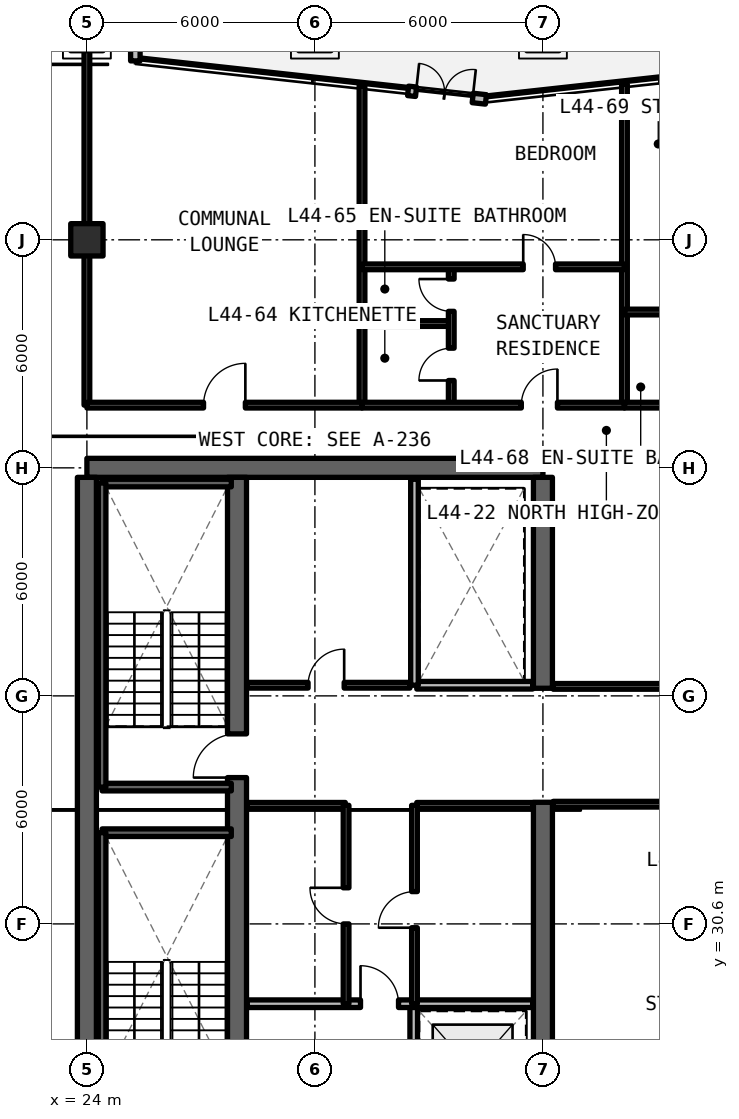
"""IFC4 building model, lengths in metres.
Left out: names, types, materials, properties, quantities, classifications, styles, units other than length and angle.
Written with IfcOpenShell. Run it as: python <this file> out.ifc"""

import sys

from ifc_helpers import new_model, si_unit, direction, frame, frame_2d, origin, origin_2d, place, context, subcontext, project, spatial, rectangle, extrude, element, fill, save


model = new_model("IFC4")
c1 = context("Model", 3, precision=1e-05, world=origin(), true_north=direction((0.0, 1.0)))
c2 = subcontext(c1, "Body", "Model", "MODEL_VIEW")
j1 = project(units=[si_unit("LENGTHUNIT", "METRE"), si_unit("PLANEANGLEUNIT", "RADIAN")], contexts=[c1])
p1 = place(None, origin())
s1 = spatial("IfcSite", under=j1, at=p1, CompositionType="ELEMENT")
p2 = place(p1, origin())
s2 = spatial("IfcBuilding", under=s1, at=p2, CompositionType="ELEMENT")
p3 = place(p2, frame((0.0, 0.0, 158.4)))
s3 = spatial("IfcBuildingStorey", under=s2, at=p3, CompositionType="ELEMENT", Elevation=158.4)
p4 = place(p3, frame((36.0, 42.6, 0.0), z_axis=(0.0, 0.0, 1.0), x_axis=(-1.0, 0.0, 0.0)))
e1 = element("IfcWall", 1, at=p4, inside=s3, PredefinedType="SHEAR", context=c2, shape_type="SweptSolid", body=[
    extrude(rectangle(XDim=12.0, YDim=0.5, at=frame_2d((6.0, 0.0))), origin(), (0.0, 0.0, 1.0), 3.63),
])
p5 = place(p3, frame((24.0, 24.85, 0.0), z_axis=(0.0, 0.0, 1.0), x_axis=(0.0, 1.0, 0.0)))
e2 = element("IfcWall", 2, at=p5, inside=s3, PredefinedType="SHEAR", context=c2, shape_type="SweptSolid", body=[
    extrude(rectangle(XDim=17.5, YDim=0.5, at=frame_2d((8.75, 0.0))), origin(), (0.0, 0.0, 1.0), 3.63),
])
p6 = place(p3, frame((36.0, 24.85, 0.0), z_axis=(0.0, 0.0, 1.0), x_axis=(0.0, 1.0, 0.0)))
e3 = element("IfcWall", 3, at=p6, inside=s3, PredefinedType="SHEAR", context=c2, shape_type="SweptSolid", body=[
    extrude(rectangle(XDim=8.95, YDim=0.5, at=frame_2d((4.475, 0.0))), origin(), (0.0, 0.0, 1.0), 3.63),
])
p7 = place(p3, frame((36.0, 36.8, 0.0), z_axis=(0.0, 0.0, 1.0), x_axis=(0.0, 1.0, 0.0)))
e4 = element("IfcWall", 4, at=p7, inside=s3, PredefinedType="SHEAR", context=c2, shape_type="SweptSolid", body=[
    extrude(rectangle(XDim=5.55, YDim=0.5, at=frame_2d((2.775, 0.0))), origin(), (0.0, 0.0, 1.0), 3.63),
])
p8 = place(p3, frame((27.95, 24.85, 0.0), z_axis=(0.0, 0.0, 1.0), x_axis=(0.0, 1.0, 0.0)))
e5 = element("IfcWall", 5, at=p8, inside=s3, PredefinedType="SHEAR", context=c2, shape_type="SweptSolid", body=[
    extrude(rectangle(XDim=17.5, YDim=0.5, at=frame_2d((8.75, 0.0))), origin(), (0.0, 0.0, 1.0), 3.63),
])
p9 = place(p8, frame((0.4, 0.0, 0.0)))
e6 = element("IfcOpeningElement", 6, at=p9, cuts=e5, PredefinedType="OPENING", context=c2, shape_type="SweptSolid", body=[
    extrude(rectangle(XDim=1.15, YDim=2.15, at=frame_2d((0.575, 1.075))), frame((0.0, 0.26, 0.0), z_axis=(0.0, -1.0, 0.0), x_axis=(1.0, 0.0, 0.0)), (0.0, 0.0, 1.0), 0.52),
])
p10 = place(p8, frame((9.6, 0.0, 0.0)))
e7 = element("IfcOpeningElement", 7, at=p10, cuts=e5, PredefinedType="OPENING", context=c2, shape_type="SweptSolid", body=[
    extrude(rectangle(XDim=1.15, YDim=2.15, at=frame_2d((0.575, 1.075))), frame((0.0, 0.26, 0.0), z_axis=(0.0, -1.0, 0.0), x_axis=(1.0, 0.0, 0.0)), (0.0, 0.0, 1.0), 0.52),
])
p11 = place(p3, frame((24.0, 48.6, 0.0), z_axis=(0.0, 0.0, 1.0), x_axis=(1.0, 0.0, 0.0)))
e8 = element("IfcColumn", 8, at=p11, inside=s3, PredefinedType="COLUMN", context=c2, shape_type="SweptSolid", body=[
    extrude(rectangle(XDim=0.85, YDim=0.85, at=origin_2d()), origin(), (0.0, 0.0, 1.0), 3.63),
])
p12 = place(p3, frame((34.5, 52.294, 0.0), z_axis=(0.0, 0.0, 1.0), x_axis=(-0.994011695941, 0.10927373121, 0.0)))
e9 = element("IfcWall", 9, at=p12, inside=s3, PredefinedType="SOLIDWALL", context=c2, shape_type="SweptSolid", body=[
    extrude(rectangle(XDim=2.06, YDim=0.25, at=frame_2d((1.03, 0.0))), origin(), (0.0, 0.0, 1.0), 3.41),
])
p13 = place(p12, frame((0.35, 0.0, 0.0)))
e10 = element("IfcOpeningElement", 10, at=p13, cuts=e9, PredefinedType="OPENING", context=c2, shape_type="SweptSolid", body=[
    extrude(rectangle(XDim=1.5, YDim=2.2, at=frame_2d((0.75, 1.1))), frame((0.0, 0.135, 0.0), z_axis=(0.0, -1.0, 0.0), x_axis=(1.0, 0.0, 0.0)), (0.0, 0.0, 1.0), 0.27),
])
p14 = place(p3, frame((25.275, 53.308, 0.0), z_axis=(0.0, 0.0, 1.0), x_axis=(0.0, 1.0, 0.0)))
e11 = element("IfcWall", 11, at=p14, inside=s3, PredefinedType="SOLIDWALL", context=c2, shape_type="SweptSolid", body=[
    extrude(rectangle(XDim=1.867, YDim=0.25, at=frame_2d((0.934, 0.0))), origin(), (0.0, 0.0, 1.0), 3.41),
])
p15 = place(p3, frame((23.852, 55.175, 0.0), z_axis=(0.0, 0.0, 1.0), x_axis=(-0.70708586489, -0.707127696864, 0.0)))
e12 = element("IfcWall", 12, at=p15, inside=s3, PredefinedType="SOLIDWALL", context=c2, shape_type="SweptSolid", body=[
    extrude(rectangle(XDim=5.836, YDim=0.25, at=frame_2d((2.918, 0.0))), origin(), (0.0, 0.0, 1.0), 3.41),
])
p16 = place(p15, frame((1.538, 0.0, 0.78)))
e13 = element("IfcOpeningElement", 13, at=p16, cuts=e12, PredefinedType="OPENING", context=c2, shape_type="SweptSolid", body=[
    extrude(rectangle(XDim=3.4, YDim=1.66, at=frame_2d((1.7, 0.83))), frame((0.0, 0.135, 0.0), z_axis=(0.0, -1.0, 0.0), x_axis=(1.0, 0.0, 0.0)), (0.0, 0.0, 1.0), 0.27),
])
p17 = place(p3, frame((32.6, 24.92, 0.0), z_axis=(0.0, 0.0, 1.0), x_axis=(0.0, 1.0, 0.0)))
e14 = element("IfcWall", 14, at=p17, inside=s3, PredefinedType="SOLIDWALL", context=c2, shape_type="SweptSolid", body=[
    extrude(rectangle(XDim=3.58, YDim=0.2, at=frame_2d((1.79, 0.0))), origin(), (0.0, 0.0, 1.0), 2.63),
])
p18 = place(p17, frame((1.3, 0.0, 0.0)))
e15 = element("IfcOpeningElement", 15, at=p18, cuts=e14, PredefinedType="OPENING", context=c2, shape_type="SweptSolid", body=[
    extrude(rectangle(XDim=1.1, YDim=2.2, at=frame_2d((0.55, 1.1))), frame((0.0, 0.11, 0.0), z_axis=(0.0, -1.0, 0.0), x_axis=(1.0, 0.0, 0.0)), (0.0, 0.0, 1.0), 0.22),
])
p19 = place(p3, frame((28.22, 28.5, 0.0), z_axis=(0.0, 0.0, 1.0), x_axis=(1.0, 0.0, 0.0)))
e16 = element("IfcWall", 16, at=p19, inside=s3, PredefinedType="SOLIDWALL", context=c2, shape_type="SweptSolid", body=[
    extrude(rectangle(XDim=7.51, YDim=0.2, at=frame_2d((3.755, 0.0))), origin(), (0.0, 0.0, 1.0), 2.63),
])
p20 = place(p19, frame((2.98, 0.0, 0.0)))
e17 = element("IfcOpeningElement", 17, at=p20, cuts=e16, PredefinedType="OPENING", context=c2, shape_type="SweptSolid", body=[
    extrude(rectangle(XDim=1.0, YDim=2.15, at=frame_2d((0.5, 1.075))), frame((0.0, 0.11, 0.0), z_axis=(0.0, -1.0, 0.0), x_axis=(1.0, 0.0, 0.0)), (0.0, 0.0, 1.0), 0.22),
])
p21 = place(p3, frame((28.22, 33.72, 0.0), z_axis=(0.0, 0.0, 1.0), x_axis=(1.0, 0.0, 0.0)))
e18 = element("IfcWall", 18, at=p21, inside=s3, PredefinedType="SOLIDWALL", context=c2, shape_type="SweptSolid", body=[
    extrude(rectangle(XDim=2.58, YDim=0.15, at=frame_2d((1.29, 0.0))), origin(), (0.0, 0.0, 1.0), 2.63),
])
p22 = place(p3, frame((30.82, 28.5, 0.0), z_axis=(0.0, 0.0, 1.0), x_axis=(0.0, 1.0, 0.0)))
e19 = element("IfcWall", 19, at=p22, inside=s3, PredefinedType="SOLIDWALL", context=c2, shape_type="SweptSolid", body=[
    extrude(rectangle(XDim=5.22, YDim=0.15, at=frame_2d((2.61, 0.0))), origin(), (0.0, 0.0, 1.0), 2.63),
])
p23 = place(p22, frame((2.1, 0.0, 0.0)))
e20 = element("IfcOpeningElement", 20, at=p23, cuts=e19, PredefinedType="OPENING", context=c2, shape_type="SweptSolid", body=[
    extrude(rectangle(XDim=0.95, YDim=2.15, at=frame_2d((0.475, 1.075))), frame((0.0, 0.085, 0.0), z_axis=(0.0, -1.0, 0.0), x_axis=(1.0, 0.0, 0.0)), (0.0, 0.0, 1.0), 0.17),
])
p24 = place(p3, frame((32.68, 33.72, 0.0), z_axis=(0.0, 0.0, 1.0), x_axis=(1.0, 0.0, 0.0)))
e21 = element("IfcWall", 21, at=p24, inside=s3, PredefinedType="SOLIDWALL", context=c2, shape_type="SweptSolid", body=[
    extrude(rectangle(XDim=3.05, YDim=0.15, at=frame_2d((1.525, 0.0))), origin(), (0.0, 0.0, 1.0), 2.63),
])
p25 = place(p3, frame((32.62, 28.5, 0.0), z_axis=(0.0, 0.0, 1.0), x_axis=(0.0, 1.0, 0.0)))
e22 = element("IfcWall", 22, at=p25, inside=s3, PredefinedType="SOLIDWALL", context=c2, shape_type="SweptSolid", body=[
    extrude(rectangle(XDim=5.22, YDim=0.15, at=frame_2d((2.61, 0.0))), origin(), (0.0, 0.0, 1.0), 2.63),
])
p26 = place(p25, frame((2.0, 0.0, 0.0)))
e23 = element("IfcOpeningElement", 23, at=p26, cuts=e22, PredefinedType="OPENING", context=c2, shape_type="SweptSolid", body=[
    extrude(rectangle(XDim=0.95, YDim=2.15, at=frame_2d((0.475, 1.075))), frame((0.0, 0.085, 0.0), z_axis=(0.0, -1.0, 0.0), x_axis=(1.0, 0.0, 0.0)), (0.0, 0.0, 1.0), 0.17),
])
p27 = place(p3, frame((28.22, 36.88, 0.0), z_axis=(0.0, 0.0, 1.0), x_axis=(1.0, 0.0, 0.0)))
e24 = element("IfcWall", 24, at=p27, inside=s3, PredefinedType="SOLIDWALL", context=c2, shape_type="SweptSolid", body=[
    extrude(rectangle(XDim=4.28, YDim=0.15, at=frame_2d((2.14, 0.0))), origin(), (0.0, 0.0, 1.0), 2.63),
])
p28 = place(p27, frame((1.6, 0.0, 0.0)))
e25 = element("IfcOpeningElement", 25, at=p28, cuts=e24, PredefinedType="OPENING", context=c2, shape_type="SweptSolid", body=[
    extrude(rectangle(XDim=0.95, YDim=2.15, at=frame_2d((0.475, 1.075))), frame((0.0, 0.085, 0.0), z_axis=(0.0, -1.0, 0.0), x_axis=(1.0, 0.0, 0.0)), (0.0, 0.0, 1.0), 0.17),
])
p29 = place(p3, frame((32.68, 36.88, 0.0), z_axis=(0.0, 0.0, 1.0), x_axis=(1.0, 0.0, 0.0)))
e26 = element("IfcWall", 26, at=p29, inside=s3, PredefinedType="SOLIDWALL", context=c2, shape_type="SweptSolid", body=[
    extrude(rectangle(XDim=3.05, YDim=0.2, at=frame_2d((1.525, 0.0))), origin(), (0.0, 0.0, 1.0), 2.63),
])
p30 = place(p3, frame((32.62, 36.88, 0.0), z_axis=(0.0, 0.0, 1.0), x_axis=(0.0, 1.0, 0.0)))
e27 = element("IfcWall", 27, at=p30, inside=s3, PredefinedType="SOLIDWALL", context=c2, shape_type="SweptSolid", body=[
    extrude(rectangle(XDim=5.42, YDim=0.2, at=frame_2d((2.71, 0.0))), origin(), (0.0, 0.0, 1.0), 2.63),
])
p31 = place(p3, frame((36.27, 33.75, 0.0), z_axis=(0.0, 0.0, 1.0), x_axis=(1.0, 0.0, 0.0)))
e28 = element("IfcWall", 28, at=p31, inside=s3, PredefinedType="SOLIDWALL", context=c2, shape_type="SweptSolid", body=[
    extrude(rectangle(XDim=7.88, YDim=0.15, at=frame_2d((3.94, 0.0))), origin(), (0.0, 0.0, 1.0), 2.63),
])
p32 = place(p31, frame((3.465, 0.0, 0.0)))
e29 = element("IfcOpeningElement", 29, at=p32, cuts=e28, PredefinedType="OPENING", context=c2, shape_type="SweptSolid", body=[
    extrude(rectangle(XDim=0.95, YDim=2.15, at=frame_2d((0.475, 1.075))), frame((0.0, 0.085, 0.0), z_axis=(0.0, -1.0, 0.0), x_axis=(1.0, 0.0, 0.0)), (0.0, 0.0, 1.0), 0.17),
])
p33 = place(p3, frame((36.27, 36.85, 0.0), z_axis=(0.0, 0.0, 1.0), x_axis=(1.0, 0.0, 0.0)))
e30 = element("IfcWall", 30, at=p33, inside=s3, PredefinedType="SOLIDWALL", context=c2, shape_type="SweptSolid", body=[
    extrude(rectangle(XDim=7.88, YDim=0.15, at=frame_2d((3.94, 0.0))), origin(), (0.0, 0.0, 1.0), 2.63),
])
p34 = place(p33, frame((3.465, 0.0, 0.0)))
e31 = element("IfcOpeningElement", 31, at=p34, cuts=e30, PredefinedType="OPENING", context=c2, shape_type="SweptSolid", body=[
    extrude(rectangle(XDim=0.95, YDim=2.15, at=frame_2d((0.475, 1.075))), frame((0.0, 0.085, 0.0), z_axis=(0.0, -1.0, 0.0), x_axis=(1.0, 0.0, 0.0)), (0.0, 0.0, 1.0), 0.17),
])
p35 = place(p3, frame((36.27, 42.85, 0.0), z_axis=(0.0, 0.0, 1.0), x_axis=(1.0, 0.0, 0.0)))
e32 = element("IfcWall", 32, at=p35, inside=s3, PredefinedType="SOLIDWALL", context=c2, shape_type="SweptSolid", body=[
    extrude(rectangle(XDim=7.88, YDim=0.15, at=frame_2d((3.94, 0.0))), origin(), (0.0, 0.0, 1.0), 2.63),
])
p36 = place(p3, frame((24.0, 44.25, 0.0), z_axis=(0.0, 0.0, 1.0), x_axis=(0.0, 1.0, 0.0)))
e33 = element("IfcWall", 33, at=p36, inside=s3, PredefinedType="SOLIDWALL", context=c2, shape_type="SweptSolid", body=[
    extrude(rectangle(XDim=10.925, YDim=0.15, at=frame_2d((5.462, 0.0))), origin(), (0.0, 0.0, 1.0), 2.63),
])
p37 = place(p3, frame((31.24, 44.25, 0.0), z_axis=(0.0, 0.0, 1.0), x_axis=(0.0, 1.0, 0.0)))
e34 = element("IfcWall", 34, at=p37, inside=s3, PredefinedType="SOLIDWALL", context=c2, shape_type="SweptSolid", body=[
    extrude(rectangle(XDim=8.403, YDim=0.15, at=frame_2d((4.201, 0.0))), origin(), (0.0, 0.0, 1.0), 2.63),
])
p38 = place(p3, frame((24.0, 44.25, 0.0), z_axis=(0.0, 0.0, 1.0), x_axis=(1.0, 0.0, 0.0)))
e35 = element("IfcWall", 35, at=p38, inside=s3, PredefinedType="SOLIDWALL", context=c2, shape_type="SweptSolid", body=[
    extrude(rectangle(XDim=7.24, YDim=0.15, at=frame_2d((3.62, 0.0))), origin(), (0.0, 0.0, 1.0), 2.63),
])
p39 = place(p38, frame((3.07, 0.0, 0.0)))
e36 = element("IfcOpeningElement", 36, at=p39, cuts=e35, PredefinedType="OPENING", context=c2, shape_type="SweptSolid", body=[
    extrude(rectangle(XDim=1.1, YDim=2.15, at=frame_2d((0.55, 1.075))), frame((0.0, 0.085, 0.0), z_axis=(0.0, -1.0, 0.0), x_axis=(1.0, 0.0, 0.0)), (0.0, 0.0, 1.0), 0.17),
])
p40 = place(p3, frame((38.146, 44.25, 0.0), z_axis=(0.0, 0.0, 1.0), x_axis=(0.0, 1.0, 0.0)))
e37 = element("IfcWall", 37, at=p40, inside=s3, PredefinedType="SOLIDWALL", context=c2, shape_type="SweptSolid", body=[
    extrude(rectangle(XDim=8.445, YDim=0.15, at=frame_2d((4.222, 0.0))), origin(), (0.0, 0.0, 1.0), 2.63),
])
p41 = place(p3, frame((31.24, 46.397, 0.0), z_axis=(0.0, 0.0, 1.0), x_axis=(1.0, 0.0, 0.0)))
e38 = element("IfcWall", 38, at=p41, inside=s3, PredefinedType="PARTITIONING", context=c2, shape_type="SweptSolid", body=[
    extrude(rectangle(XDim=2.348, YDim=0.15, at=frame_2d((1.174, 0.0))), origin(), (0.0, 0.0, 1.0), 2.63),
])
p42 = place(p3, frame((33.588, 44.25, 0.0), z_axis=(0.0, 0.0, 1.0), x_axis=(0.0, 1.0, 0.0)))
e39 = element("IfcWall", 39, at=p42, inside=s3, PredefinedType="PARTITIONING", context=c2, shape_type="SweptSolid", body=[
    extrude(rectangle(XDim=3.639, YDim=0.15, at=frame_2d((1.819, 0.0))), origin(), (0.0, 0.0, 1.0), 2.63),
])
p43 = place(p42, frame((0.648, 0.0, 0.0)))
e40 = element("IfcOpeningElement", 40, at=p43, cuts=e39, PredefinedType="OPENING", context=c2, shape_type="SweptSolid", body=[
    extrude(rectangle(XDim=0.85, YDim=2.1, at=frame_2d((0.425, 1.05))), frame((0.0, 0.085, 0.0), z_axis=(0.0, -1.0, 0.0), x_axis=(1.0, 0.0, 0.0)), (0.0, 0.0, 1.0), 0.17),
])
p44 = place(p42, frame((2.468, 0.0, 0.0)))
e41 = element("IfcOpeningElement", 41, at=p44, cuts=e39, PredefinedType="OPENING", context=c2, shape_type="SweptSolid", body=[
    extrude(rectangle(XDim=0.85, YDim=2.1, at=frame_2d((0.425, 1.05))), frame((0.0, 0.085, 0.0), z_axis=(0.0, -1.0, 0.0), x_axis=(1.0, 0.0, 0.0)), (0.0, 0.0, 1.0), 0.17),
])
p45 = place(p3, frame((31.24, 47.889, 0.0), z_axis=(0.0, 0.0, 1.0), x_axis=(1.0, 0.0, 0.0)))
e42 = element("IfcWall", 42, at=p45, inside=s3, PredefinedType="PARTITIONING", context=c2, shape_type="SweptSolid", body=[
    extrude(rectangle(XDim=6.906, YDim=0.15, at=frame_2d((3.453, 0.0))), origin(), (0.0, 0.0, 1.0), 2.63),
])
p46 = place(p45, frame((4.242, 0.0, 0.0)))
e43 = element("IfcOpeningElement", 43, at=p46, cuts=e42, PredefinedType="OPENING", context=c2, shape_type="SweptSolid", body=[
    extrude(rectangle(XDim=0.85, YDim=2.1, at=frame_2d((0.425, 1.05))), frame((0.0, 0.085, 0.0), z_axis=(0.0, -1.0, 0.0), x_axis=(1.0, 0.0, 0.0)), (0.0, 0.0, 1.0), 0.17),
])
p47 = place(p3, frame((31.24, 44.25, 0.0), z_axis=(0.0, 0.0, 1.0), x_axis=(1.0, 0.0, 0.0)))
e44 = element("IfcWall", 44, at=p47, inside=s3, PredefinedType="SOLIDWALL", context=c2, shape_type="SweptSolid", body=[
    extrude(rectangle(XDim=6.906, YDim=0.15, at=frame_2d((3.453, 0.0))), origin(), (0.0, 0.0, 1.0), 2.63),
])
p48 = place(p47, frame((4.192, 0.0, 0.0)))
e45 = element("IfcOpeningElement", 45, at=p48, cuts=e44, PredefinedType="OPENING", context=c2, shape_type="SweptSolid", body=[
    extrude(rectangle(XDim=0.95, YDim=2.15, at=frame_2d((0.475, 1.075))), frame((0.0, 0.085, 0.0), z_axis=(0.0, -1.0, 0.0), x_axis=(1.0, 0.0, 0.0)), (0.0, 0.0, 1.0), 0.17),
])
p49 = place(p3, frame((38.146, 46.7, 0.0), z_axis=(0.0, 0.0, 1.0), x_axis=(1.0, 0.0, 0.0)))
e46 = element("IfcWall", 46, at=p49, inside=s3, PredefinedType="PARTITIONING", context=c2, shape_type="SweptSolid", body=[
    extrude(rectangle(XDim=1.85, YDim=0.15, at=frame_2d((0.925, 0.0))), origin(), (0.0, 0.0, 1.0), 2.63),
])
p50 = place(p3, frame((38.146, 44.25, 0.0), z_axis=(0.0, 0.0, 1.0), x_axis=(1.0, 0.0, 0.0)))
e47 = element("IfcWall", 47, at=p50, inside=s3, PredefinedType="SOLIDWALL", context=c2, shape_type="SweptSolid", body=[
    extrude(rectangle(XDim=5.334, YDim=0.15, at=frame_2d((2.667, 0.0))), origin(), (0.0, 0.0, 1.0), 2.63),
])
p51 = place(p50, frame((2.437, 0.0, 0.0)))
e48 = element("IfcOpeningElement", 48, at=p51, cuts=e47, PredefinedType="OPENING", context=c2, shape_type="SweptSolid", body=[
    extrude(rectangle(XDim=0.95, YDim=2.15, at=frame_2d((0.475, 1.075))), frame((0.0, 0.085, 0.0), z_axis=(0.0, -1.0, 0.0), x_axis=(1.0, 0.0, 0.0)), (0.0, 0.0, 1.0), 0.17),
])
p52 = place(p3, frame((27.8, 33.0, 0.0), z_axis=(0.0, 0.0, 1.0), x_axis=(-1.0, 0.0, 0.0)))
e49 = element("IfcWall", 49, at=p52, inside=s3, PredefinedType="SOLIDWALL", context=c2, shape_type="SweptSolid", body=[
    extrude(rectangle(XDim=3.4, YDim=0.2, at=frame_2d((1.7, 0.0))), origin(), (0.0, 0.0, 1.0), 3.63),
])
p53 = place(p3, frame((24.4, 33.0, 0.0), z_axis=(0.0, 0.0, 1.0), x_axis=(0.0, -1.0, 0.0)))
e50 = element("IfcWall", 50, at=p53, inside=s3, PredefinedType="SOLIDWALL", context=c2, shape_type="SweptSolid", body=[
    extrude(rectangle(XDim=8.0, YDim=0.2, at=frame_2d((4.0, 0.0))), origin(), (0.0, 0.0, 1.0), 3.63),
])
for number, where, z_axis, x_axis in (
    (51, (24.4, 34.2, 0.0), (0.0, 0.0, 1.0), (1.0, 0.0, 0.0)),
    (52, (27.8, 42.2, 0.0), (0.0, 0.0, 1.0), (-1.0, 0.0, 0.0)),
):
    element("IfcWall", number, at=place(p3, frame(where, z_axis=z_axis, x_axis=x_axis)), inside=s3, PredefinedType="SOLIDWALL", context=c2, shape_type="SweptSolid", body=[
        extrude(rectangle(XDim=3.4, YDim=0.2, at=frame_2d((1.7, 0.0))), origin(), (0.0, 0.0, 1.0), 3.63),
    ])
p54 = place(p3, frame((24.4, 42.2, 0.0), z_axis=(0.0, 0.0, 1.0), x_axis=(0.0, -1.0, 0.0)))
e53 = element("IfcWall", 53, at=p54, inside=s3, PredefinedType="SOLIDWALL", context=c2, shape_type="SweptSolid", body=[
    extrude(rectangle(XDim=8.0, YDim=0.2, at=frame_2d((4.0, 0.0))), origin(), (0.0, 0.0, 1.0), 3.63),
])
p55 = place(p13, frame((1.5, 0.0, 0.0), z_axis=(0.0, 0.0, 1.0), x_axis=(-1.0, 0.0, 0.0)))
e54 = element("IfcDoor", 54, at=p55, inside=s3, OperationType="SINGLE_SWING_LEFT", PredefinedType="DOOR", context=c2, shape_type="SweptSolid", body=[
    extrude(rectangle(XDim=1.5, YDim=2.2, at=frame_2d((0.75, 1.1))), frame((0.0, 0.025, 0.0), z_axis=(0.0, -1.0, 0.0), x_axis=(1.0, 0.0, 0.0)), (0.0, 0.0, 1.0), 0.05),
])
fill(e10, e54)
p56 = place(p20, origin())
e55 = element("IfcDoor", 55, at=p56, inside=s3, OperationType="SINGLE_SWING_LEFT", PredefinedType="DOOR", context=c2, shape_type="SweptSolid", body=[
    extrude(rectangle(XDim=1.0, YDim=2.15, at=frame_2d((0.5, 1.075))), frame((0.0, 0.025, 0.0), z_axis=(0.0, -1.0, 0.0), x_axis=(1.0, 0.0, 0.0)), (0.0, 0.0, 1.0), 0.05),
])
fill(e17, e55)
p57 = place(p23, origin())
e56 = element("IfcDoor", 56, at=p57, inside=s3, OperationType="SINGLE_SWING_RIGHT", PredefinedType="DOOR", context=c2, shape_type="SweptSolid", body=[
    extrude(rectangle(XDim=0.95, YDim=2.15, at=frame_2d((0.475, 1.075))), frame((0.0, 0.025, 0.0), z_axis=(0.0, -1.0, 0.0), x_axis=(1.0, 0.0, 0.0)), (0.0, 0.0, 1.0), 0.05),
])
fill(e20, e56)
p58 = place(p26, origin())
e57 = element("IfcDoor", 57, at=p58, inside=s3, OperationType="SINGLE_SWING_LEFT", PredefinedType="DOOR", context=c2, shape_type="SweptSolid", body=[
    extrude(rectangle(XDim=0.95, YDim=2.15, at=frame_2d((0.475, 1.075))), frame((0.0, 0.025, 0.0), z_axis=(0.0, -1.0, 0.0), x_axis=(1.0, 0.0, 0.0)), (0.0, 0.0, 1.0), 0.05),
])
fill(e23, e57)
p59 = place(p28, origin())
e58 = element("IfcDoor", 58, at=p59, inside=s3, OperationType="SINGLE_SWING_RIGHT", PredefinedType="DOOR", context=c2, shape_type="SweptSolid", body=[
    extrude(rectangle(XDim=0.95, YDim=2.15, at=frame_2d((0.475, 1.075))), frame((0.0, 0.025, 0.0), z_axis=(0.0, -1.0, 0.0), x_axis=(1.0, 0.0, 0.0)), (0.0, 0.0, 1.0), 0.05),
])
fill(e25, e58)
p60 = place(p39, origin())
e59 = element("IfcDoor", 59, at=p60, inside=s3, OperationType="SINGLE_SWING_RIGHT", PredefinedType="DOOR", context=c2, shape_type="SweptSolid", body=[
    extrude(rectangle(XDim=1.1, YDim=2.15, at=frame_2d((0.55, 1.075))), frame((0.0, 0.025, 0.0), z_axis=(0.0, -1.0, 0.0), x_axis=(1.0, 0.0, 0.0)), (0.0, 0.0, 1.0), 0.05),
])
fill(e36, e59)
p61 = place(p43, origin())
e60 = element("IfcDoor", 60, at=p61, inside=s3, OperationType="SINGLE_SWING_LEFT", PredefinedType="DOOR", context=c2, shape_type="SweptSolid", body=[
    extrude(rectangle(XDim=0.85, YDim=2.1, at=frame_2d((0.425, 1.05))), frame((0.0, 0.025, 0.0), z_axis=(0.0, -1.0, 0.0), x_axis=(1.0, 0.0, 0.0)), (0.0, 0.0, 1.0), 0.05),
])
fill(e40, e60)
p62 = place(p44, origin())
e61 = element("IfcDoor", 61, at=p62, inside=s3, OperationType="SINGLE_SWING_RIGHT", PredefinedType="DOOR", context=c2, shape_type="SweptSolid", body=[
    extrude(rectangle(XDim=0.85, YDim=2.1, at=frame_2d((0.425, 1.05))), frame((0.0, 0.025, 0.0), z_axis=(0.0, -1.0, 0.0), x_axis=(1.0, 0.0, 0.0)), (0.0, 0.0, 1.0), 0.05),
])
fill(e41, e61)
p63 = place(p46, origin())
e62 = element("IfcDoor", 62, at=p63, inside=s3, OperationType="SINGLE_SWING_LEFT", PredefinedType="DOOR", context=c2, shape_type="SweptSolid", body=[
    extrude(rectangle(XDim=0.85, YDim=2.1, at=frame_2d((0.425, 1.05))), frame((0.0, 0.025, 0.0), z_axis=(0.0, -1.0, 0.0), x_axis=(1.0, 0.0, 0.0)), (0.0, 0.0, 1.0), 0.05),
])
fill(e43, e62)
p64 = place(p48, origin())
e63 = element("IfcDoor", 63, at=p64, inside=s3, OperationType="SINGLE_SWING_RIGHT", PredefinedType="DOOR", context=c2, shape_type="SweptSolid", body=[
    extrude(rectangle(XDim=0.95, YDim=2.15, at=frame_2d((0.475, 1.075))), frame((0.0, 0.025, 0.0), z_axis=(0.0, -1.0, 0.0), x_axis=(1.0, 0.0, 0.0)), (0.0, 0.0, 1.0), 0.05),
])
fill(e45, e63)
p65 = place(p10, origin())
e64 = element("IfcDoor", 64, at=p65, inside=s3, OperationType="SINGLE_SWING_RIGHT", PredefinedType="DOOR", context=c2, shape_type="SweptSolid", body=[
    extrude(rectangle(XDim=1.15, YDim=2.15, at=frame_2d((0.575, 1.075))), frame((0.0, 0.025, 0.0), z_axis=(0.0, -1.0, 0.0), x_axis=(1.0, 0.0, 0.0)), (0.0, 0.0, 1.0), 0.05),
])
fill(e7, e64)
save(model, sys.argv[1])
